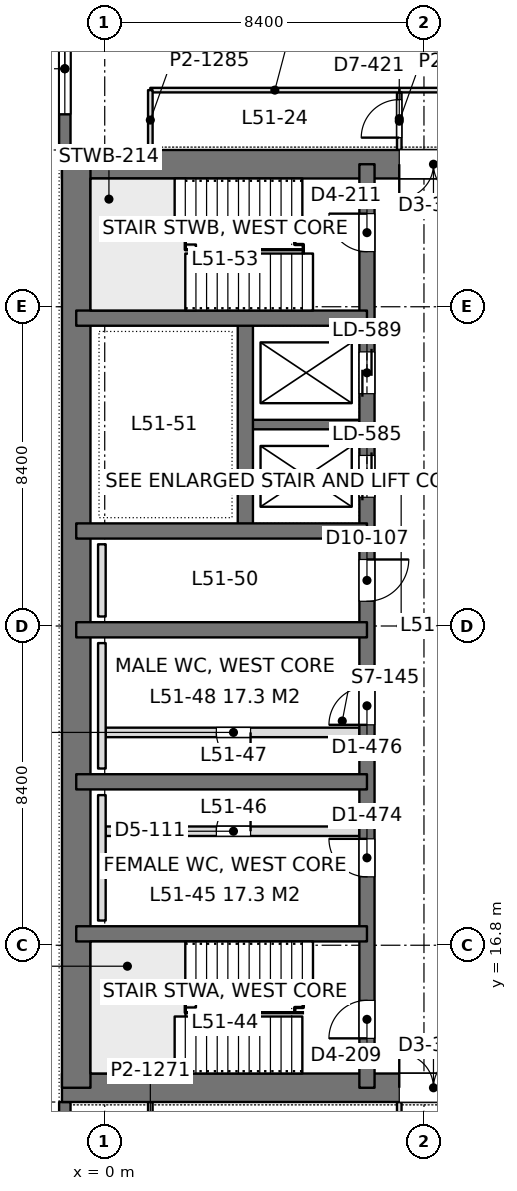
"""IFC4 building model, lengths in metres.
Left out: names, types, materials, properties, quantities, classifications, styles, units other than length and angle.
Written with IfcOpenShell. Run it as: python <this file> out.ifc"""

import sys

from ifc_helpers import new_model, si_unit, direction, frame, frame_2d, origin, place, context, subcontext, project, spatial, rectangle, extrude, element, fill, save


model = new_model("IFC4")
c1 = context("Model", 3, precision=1e-05, world=origin(), true_north=direction((0.0, 1.0)))
c2 = subcontext(c1, "Body", "Model", "MODEL_VIEW")
j1 = project(units=[si_unit("LENGTHUNIT", "METRE"), si_unit("PLANEANGLEUNIT", "RADIAN")], contexts=[c1])
p1 = place(None, origin())
s1 = spatial("IfcSite", under=j1, at=p1, CompositionType="ELEMENT")
p2 = place(p1, origin())
s2 = spatial("IfcBuilding", under=s1, at=p2, CompositionType="ELEMENT")
p3 = place(p2, frame((0.0, 0.0, 223.8)))
s3 = spatial("IfcBuildingStorey", under=s2, at=p3, CompositionType="ELEMENT", Elevation=223.8)
p4 = place(p3, frame((-1.125, 13.05, 0.0), z_axis=(0.0, 0.0, 1.0), x_axis=(1.0, 0.0, 0.0)))
e1 = element("IfcWall", 1, at=p4, inside=s3, PredefinedType="SHEAR", context=c2, shape_type="SweptSolid", body=[
    extrude(rectangle(XDim=17.85, YDim=0.75, at=frame_2d((8.925, 0.0))), origin(), (0.0, 0.0, 1.0), 4.2),
])
p5 = place(p4, frame((8.875, 0.0, 0.0)))
e2 = element("IfcOpeningElement", 2, at=p5, cuts=e1, PredefinedType="OPENING", context=c2, shape_type="SweptSolid", body=[
    extrude(rectangle(XDim=1.8, YDim=2.4, at=frame_2d((0.9, 1.2))), frame((0.0, 0.385, 0.0), z_axis=(0.0, -1.0, 0.0), x_axis=(1.0, 0.0, 0.0)), (0.0, 0.0, 1.0), 0.77),
])
p6 = place(p3, frame((-1.125, 37.35, 0.0), z_axis=(0.0, 0.0, 1.0), x_axis=(1.0, 0.0, 0.0)))
e3 = element("IfcWall", 3, at=p6, inside=s3, PredefinedType="SHEAR", context=c2, shape_type="SweptSolid", body=[
    extrude(rectangle(XDim=17.85, YDim=0.75, at=frame_2d((8.925, 0.0))), origin(), (0.0, 0.0, 1.0), 4.2),
])
p7 = place(p6, frame((8.875, 0.0, 0.0)))
e4 = element("IfcOpeningElement", 4, at=p7, cuts=e3, PredefinedType="OPENING", context=c2, shape_type="SweptSolid", body=[
    extrude(rectangle(XDim=1.8, YDim=2.4, at=frame_2d((0.9, 1.2))), frame((0.0, 0.385, 0.0), z_axis=(0.0, -1.0, 0.0), x_axis=(1.0, 0.0, 0.0)), (0.0, 0.0, 1.0), 0.77),
])
p8 = place(p3, frame((-0.75, 13.05, 0.0), z_axis=(0.0, 0.0, 1.0), x_axis=(0.0, 1.0, 0.0)))
e5 = element("IfcWall", 5, at=p8, inside=s3, PredefinedType="SHEAR", context=c2, shape_type="SweptSolid", body=[
    extrude(rectangle(XDim=24.3, YDim=0.75, at=frame_2d((12.15, 0.0))), origin(), (0.0, 0.0, 1.0), 4.2),
])
p9 = place(p3, frame((6.9, 13.05, 0.0), z_axis=(0.0, 0.0, 1.0), x_axis=(0.0, 1.0, 0.0)))
e6 = element("IfcWall", 6, at=p9, inside=s3, PredefinedType="SHEAR", context=c2, shape_type="SweptSolid", body=[
    extrude(rectangle(XDim=24.3, YDim=0.4, at=frame_2d((12.15, 0.0))), origin(), (0.0, 0.0, 1.0), 4.2),
])
p10 = place(p9, frame((1.3, 0.0, 0.0)))
e7 = element("IfcOpeningElement", 7, at=p10, cuts=e6, PredefinedType="OPENING", context=c2, shape_type="SweptSolid", body=[
    extrude(rectangle(XDim=1.0, YDim=2.2, at=frame_2d((0.5, 1.1))), frame((0.0, 0.21, 0.0), z_axis=(0.0, -1.0, 0.0), x_axis=(1.0, 0.0, 0.0)), (0.0, 0.0, 1.0), 0.42),
])
p11 = place(p9, frame((22.0, 0.0, 0.0)))
e8 = element("IfcOpeningElement", 8, at=p11, cuts=e6, PredefinedType="OPENING", context=c2, shape_type="SweptSolid", body=[
    extrude(rectangle(XDim=1.0, YDim=2.2, at=frame_2d((0.5, 1.1))), frame((0.0, 0.21, 0.0), z_axis=(0.0, -1.0, 0.0), x_axis=(1.0, 0.0, 0.0)), (0.0, 0.0, 1.0), 0.42),
])
p12 = place(p9, frame((5.55, 0.0, 0.0)))
e9 = element("IfcOpeningElement", 9, at=p12, cuts=e6, PredefinedType="OPENING", context=c2, shape_type="SweptSolid", body=[
    extrude(rectangle(XDim=1.0, YDim=2.2, at=frame_2d((0.5, 1.1))), frame((0.0, 0.21, 0.0), z_axis=(0.0, -1.0, 0.0), x_axis=(1.0, 0.0, 0.0)), (0.0, 0.0, 1.0), 0.42),
])
p13 = place(p9, frame((9.55, 0.0, 0.0)))
e10 = element("IfcOpeningElement", 10, at=p13, cuts=e6, PredefinedType="OPENING", context=c2, shape_type="SweptSolid", body=[
    extrude(rectangle(XDim=1.0, YDim=2.2, at=frame_2d((0.5, 1.1))), frame((0.0, 0.21, 0.0), z_axis=(0.0, -1.0, 0.0), x_axis=(1.0, 0.0, 0.0)), (0.0, 0.0, 1.0), 0.42),
])
p14 = place(p9, frame((12.8, 0.0, 0.0)))
e11 = element("IfcOpeningElement", 11, at=p14, cuts=e6, PredefinedType="OPENING", context=c2, shape_type="SweptSolid", body=[
    extrude(rectangle(XDim=1.1, YDim=2.2, at=frame_2d((0.55, 1.1))), frame((0.0, 0.21, 0.0), z_axis=(0.0, -1.0, 0.0), x_axis=(1.0, 0.0, 0.0)), (0.0, 0.0, 1.0), 0.42),
])
p15 = place(p9, frame((15.538, 0.0, 0.0)))
e12 = element("IfcOpeningElement", 12, at=p15, cuts=e6, PredefinedType="OPENING", context=c2, shape_type="SweptSolid", body=[
    extrude(rectangle(XDim=1.1, YDim=2.2, at=frame_2d((0.55, 1.1))), frame((0.0, 0.21, 0.0), z_axis=(0.0, -1.0, 0.0), x_axis=(1.0, 0.0, 0.0)), (0.0, 0.0, 1.0), 0.42),
])
p16 = place(p9, frame((18.262, 0.0, 0.0)))
e13 = element("IfcOpeningElement", 13, at=p16, cuts=e6, PredefinedType="OPENING", context=c2, shape_type="SweptSolid", body=[
    extrude(rectangle(XDim=1.1, YDim=2.2, at=frame_2d((0.55, 1.1))), frame((0.0, 0.21, 0.0), z_axis=(0.0, -1.0, 0.0), x_axis=(1.0, 0.0, 0.0)), (0.0, 0.0, 1.0), 0.42),
])
for number, where, z_axis, x_axis in (
    (14, (-0.75, 17.1, 0.0), (0.0, 0.0, 1.0), (1.0, 0.0, 0.0)),
    (15, (-0.75, 21.1, 0.0), (0.0, 0.0, 1.0), (1.0, 0.0, 0.0)),
    (16, (-0.75, 25.1, 0.0), (0.0, 0.0, 1.0), (1.0, 0.0, 0.0)),
    (17, (-0.75, 27.7, 0.0), (0.0, 0.0, 1.0), (1.0, 0.0, 0.0)),
    (18, (-0.75, 33.3, 0.0), (0.0, 0.0, 1.0), (1.0, 0.0, 0.0)),
):
    element("IfcWall", number, at=place(p3, frame(where, z_axis=z_axis, x_axis=x_axis)), inside=s3, PredefinedType="SHEAR", context=c2, shape_type="SweptSolid", body=[
        extrude(rectangle(XDim=7.65, YDim=0.4, at=frame_2d((3.825, 0.0))), origin(), (0.0, 0.0, 1.0), 4.2),
    ])
p17 = place(p3, frame((3.7, 27.7, 0.0), z_axis=(0.0, 0.0, 1.0), x_axis=(0.0, 1.0, 0.0)))
e19 = element("IfcWall", 19, at=p17, inside=s3, PredefinedType="SHEAR", context=c2, shape_type="SweptSolid", body=[
    extrude(rectangle(XDim=5.6, YDim=0.4, at=frame_2d((2.8, 0.0))), origin(), (0.0, 0.0, 1.0), 4.2),
])
p18 = place(p3, frame((3.7, 30.5, 0.0), z_axis=(0.0, 0.0, 1.0), x_axis=(1.0, 0.0, 0.0)))
e20 = element("IfcWall", 20, at=p18, inside=s3, PredefinedType="SHEAR", context=c2, shape_type="SweptSolid", body=[
    extrude(rectangle(XDim=3.2, YDim=0.25, at=frame_2d((1.6, 0.0))), origin(), (0.0, 0.0, 1.0), 4.2),
])
p19 = place(p3, frame((-1.05, 8.4, 0.0), z_axis=(0.0, 0.0, 1.0), x_axis=(0.0, 1.0, 0.0)))
e21 = element("IfcWall", 21, at=p19, inside=s3, PredefinedType="SOLIDWALL", context=c2, shape_type="SweptSolid", body=[
    extrude(rectangle(XDim=4.275, YDim=0.3, at=frame_2d((2.138, 0.0))), origin(), (0.0, 0.0, 1.0), 4.05),
])
p20 = place(p19, frame((0.938, 0.0, 0.9)))
e22 = element("IfcOpeningElement", 22, at=p20, cuts=e21, PredefinedType="OPENING", context=c2, shape_type="SweptSolid", body=[
    extrude(rectangle(XDim=2.4, YDim=1.9, at=frame_2d((1.2, 0.95))), frame((0.0, 0.16, 0.0), z_axis=(0.0, -1.0, 0.0), x_axis=(1.0, 0.0, 0.0)), (0.0, 0.0, 1.0), 0.32),
])
p21 = place(p3, frame((-1.05, 37.725, 0.0), z_axis=(0.0, 0.0, 1.0), x_axis=(0.0, 1.0, 0.0)))
e23 = element("IfcWall", 23, at=p21, inside=s3, PredefinedType="SOLIDWALL", context=c2, shape_type="SweptSolid", body=[
    extrude(rectangle(XDim=4.275, YDim=0.3, at=frame_2d((2.137, 0.0))), origin(), (0.0, 0.0, 1.0), 4.05),
])
p22 = place(p21, frame((0.938, 0.0, 0.9)))
e24 = element("IfcOpeningElement", 24, at=p22, cuts=e23, PredefinedType="OPENING", context=c2, shape_type="SweptSolid", body=[
    extrude(rectangle(XDim=2.4, YDim=1.9, at=frame_2d((1.2, 0.95))), frame((0.0, 0.16, 0.0), z_axis=(0.0, -1.0, 0.0), x_axis=(1.0, 0.0, 0.0)), (0.0, 0.0, 1.0), 0.32),
])
p23 = place(p3, frame((7.75, 11.158, 0.0), z_axis=(0.0, 0.0, 1.0), x_axis=(0.0, 1.0, 0.0)))
e25 = element("IfcWall", 25, at=p23, inside=s3, PredefinedType="PARTITIONING", context=c2, shape_type="SweptSolid", body=[
    extrude(rectangle(XDim=1.518, YDim=0.12, at=frame_2d((0.759, 0.0))), origin(), (0.0, 0.0, 1.0), 4.05),
])
p24 = place(p23, frame((0.192, 0.0, 0.0)))
e26 = element("IfcOpeningElement", 26, at=p24, cuts=e25, PredefinedType="OPENING", context=c2, shape_type="SweptSolid", body=[
    extrude(rectangle(XDim=1.0, YDim=2.4, at=frame_2d((0.5, 1.2))), frame((0.0, 0.07, 0.0), z_axis=(0.0, -1.0, 0.0), x_axis=(1.0, 0.0, 0.0)), (0.0, 0.0, 1.0), 0.14),
])
p25 = place(p3, frame((1.2, 11.1, 0.0), z_axis=(0.0, 0.0, 1.0), x_axis=(0.0, 1.0, 0.0)))
e27 = element("IfcWall", 27, at=p25, inside=s3, PredefinedType="PARTITIONING", context=c2, shape_type="SweptSolid", body=[
    extrude(rectangle(XDim=1.576, YDim=0.12, at=frame_2d((0.788, 0.0))), origin(), (0.0, 0.0, 1.0), 4.05),
])
p26 = place(p3, frame((7.748, 39.3, 0.0), z_axis=(0.0, 0.0, 1.0), x_axis=(1.0, 0.0, 0.0)))
e28 = element("IfcWall", 28, at=p26, inside=s3, PredefinedType="PARTITIONING", context=c2, shape_type="SweptSolid", body=[
    extrude(rectangle(XDim=41.452, YDim=0.12, at=frame_2d((20.726, 0.0))), origin(), (0.0, 0.0, 1.0), 3.55),
])
p27 = place(p26, frame((1.527, 0.0, 0.0)))
e29 = element("IfcOpeningElement", 29, at=p27, cuts=e28, PredefinedType="OPENING", context=c2, shape_type="SweptSolid", body=[
    extrude(rectangle(XDim=1.8, YDim=2.2, at=frame_2d((0.9, 1.1))), frame((0.0, 0.07, 0.0), z_axis=(0.0, -1.0, 0.0), x_axis=(1.0, 0.0, 0.0)), (0.0, 0.0, 1.0), 0.14),
])
p28 = place(p26, frame((8.152, 0.0, 0.0)))
e30 = element("IfcOpeningElement", 30, at=p28, cuts=e28, PredefinedType="OPENING", context=c2, shape_type="SweptSolid", body=[
    extrude(rectangle(XDim=1.8, YDim=2.2, at=frame_2d((0.9, 1.1))), frame((0.0, 0.07, 0.0), z_axis=(0.0, -1.0, 0.0), x_axis=(1.0, 0.0, 0.0)), (0.0, 0.0, 1.0), 0.14),
])
p29 = place(p26, frame((12.352, 0.0, 0.0)))
e31 = element("IfcOpeningElement", 31, at=p29, cuts=e28, PredefinedType="OPENING", context=c2, shape_type="SweptSolid", body=[
    extrude(rectangle(XDim=1.8, YDim=2.2, at=frame_2d((0.9, 1.1))), frame((0.0, 0.07, 0.0), z_axis=(0.0, -1.0, 0.0), x_axis=(1.0, 0.0, 0.0)), (0.0, 0.0, 1.0), 0.14),
])
p30 = place(p26, frame((20.752, 0.0, 0.0)))
e32 = element("IfcOpeningElement", 32, at=p30, cuts=e28, PredefinedType="OPENING", context=c2, shape_type="SweptSolid", body=[
    extrude(rectangle(XDim=1.8, YDim=2.2, at=frame_2d((0.9, 1.1))), frame((0.0, 0.07, 0.0), z_axis=(0.0, -1.0, 0.0), x_axis=(1.0, 0.0, 0.0)), (0.0, 0.0, 1.0), 0.14),
])
p31 = place(p26, frame((24.952, 0.0, 0.0)))
e33 = element("IfcOpeningElement", 33, at=p31, cuts=e28, PredefinedType="OPENING", context=c2, shape_type="SweptSolid", body=[
    extrude(rectangle(XDim=1.8, YDim=2.2, at=frame_2d((0.9, 1.1))), frame((0.0, 0.07, 0.0), z_axis=(0.0, -1.0, 0.0), x_axis=(1.0, 0.0, 0.0)), (0.0, 0.0, 1.0), 0.14),
])
p32 = place(p26, frame((32.952, 0.0, 0.0)))
e34 = element("IfcOpeningElement", 34, at=p32, cuts=e28, PredefinedType="OPENING", context=c2, shape_type="SweptSolid", body=[
    extrude(rectangle(XDim=1.8, YDim=2.2, at=frame_2d((0.9, 1.1))), frame((0.0, 0.07, 0.0), z_axis=(0.0, -1.0, 0.0), x_axis=(1.0, 0.0, 0.0)), (0.0, 0.0, 1.0), 0.14),
])
p33 = place(p26, frame((36.752, 0.0, 0.0)))
e35 = element("IfcOpeningElement", 35, at=p33, cuts=e28, PredefinedType="OPENING", context=c2, shape_type="SweptSolid", body=[
    extrude(rectangle(XDim=1.8, YDim=2.2, at=frame_2d((0.9, 1.1))), frame((0.0, 0.07, 0.0), z_axis=(0.0, -1.0, 0.0), x_axis=(1.0, 0.0, 0.0)), (0.0, 0.0, 1.0), 0.14),
])
p34 = place(p3, frame((7.75, 37.724, 0.0), z_axis=(0.0, 0.0, 1.0), x_axis=(0.0, 1.0, 0.0)))
e36 = element("IfcWall", 36, at=p34, inside=s3, PredefinedType="PARTITIONING", context=c2, shape_type="SweptSolid", body=[
    extrude(rectangle(XDim=1.518, YDim=0.12, at=frame_2d((0.759, 0.0))), origin(), (0.0, 0.0, 1.0), 4.05),
])
p35 = place(p34, frame((0.326, 0.0, 0.0)))
e37 = element("IfcOpeningElement", 37, at=p35, cuts=e36, PredefinedType="OPENING", context=c2, shape_type="SweptSolid", body=[
    extrude(rectangle(XDim=1.0, YDim=2.4, at=frame_2d((0.5, 1.2))), frame((0.0, 0.07, 0.0), z_axis=(0.0, -1.0, 0.0), x_axis=(1.0, 0.0, 0.0)), (0.0, 0.0, 1.0), 0.14),
])
p36 = place(p3, frame((1.2, 39.3, 0.0), z_axis=(0.0, 0.0, 1.0), x_axis=(1.0, 0.0, 0.0)))
e38 = element("IfcWall", 38, at=p36, inside=s3, PredefinedType="PARTITIONING", context=c2, shape_type="SweptSolid", body=[
    extrude(rectangle(XDim=6.552, YDim=0.12, at=frame_2d((3.276, 0.0))), origin(), (0.0, 0.0, 1.0), 3.69),
])
p37 = place(p3, frame((1.2, 37.724, 0.0), z_axis=(0.0, 0.0, 1.0), x_axis=(0.0, 1.0, 0.0)))
e39 = element("IfcWall", 39, at=p37, inside=s3, PredefinedType="PARTITIONING", context=c2, shape_type="SweptSolid", body=[
    extrude(rectangle(XDim=1.576, YDim=0.12, at=frame_2d((0.788, 0.0))), origin(), (0.0, 0.0, 1.0), 4.05),
])
p38 = place(p3, frame((0.025, 22.4, 0.0), z_axis=(0.0, 0.0, 1.0), x_axis=(1.0, 0.0, 0.0)))
e40 = element("IfcWall", 40, at=p38, inside=s3, PredefinedType="PARTITIONING", context=c2, shape_type="SweptSolid", body=[
    extrude(rectangle(XDim=6.675, YDim=0.25, at=frame_2d((3.337, 0.0))), origin(), (0.0, 0.0, 1.0), 4.0),
])
p39 = place(p38, frame((2.913, 0.0, 0.0)))
e41 = element("IfcOpeningElement", 41, at=p39, cuts=e40, PredefinedType="OPENING", context=c2, shape_type="SweptSolid", body=[
    extrude(rectangle(XDim=0.9, YDim=2.2, at=frame_2d((0.45, 1.1))), frame((0.0, 0.135, 0.0), z_axis=(0.0, -1.0, 0.0), x_axis=(1.0, 0.0, 0.0)), (0.0, 0.0, 1.0), 0.27),
])
p40 = place(p3, frame((0.025, 19.8, 0.0), z_axis=(0.0, 0.0, 1.0), x_axis=(1.0, 0.0, 0.0)))
e42 = element("IfcWall", 42, at=p40, inside=s3, PredefinedType="PARTITIONING", context=c2, shape_type="SweptSolid", body=[
    extrude(rectangle(XDim=6.675, YDim=0.25, at=frame_2d((3.337, 0.0))), origin(), (0.0, 0.0, 1.0), 4.0),
])
p41 = place(p40, frame((2.913, 0.0, 0.0)))
e43 = element("IfcOpeningElement", 43, at=p41, cuts=e42, PredefinedType="OPENING", context=c2, shape_type="SweptSolid", body=[
    extrude(rectangle(XDim=0.9, YDim=2.2, at=frame_2d((0.45, 1.1))), frame((0.0, 0.135, 0.0), z_axis=(0.0, -1.0, 0.0), x_axis=(1.0, 0.0, 0.0)), (0.0, 0.0, 1.0), 0.27),
])
for number, where, z_axis, x_axis in (
    (44, (-0.075, 17.45, 0.0), (0.0, 0.0, 1.0), (0.0, 1.0, 0.0)),
    (45, (-0.075, 21.45, 0.0), (0.0, 0.0, 1.0), (0.0, 1.0, 0.0)),
):
    element("IfcWall", number, at=place(p3, frame(where, z_axis=z_axis, x_axis=x_axis)), inside=s3, PredefinedType="PLUMBINGWALL", context=c2, shape_type="SweptSolid", body=[
        extrude(rectangle(XDim=3.3, YDim=0.2, at=frame_2d((1.65, 0.0))), origin(), (0.0, 0.0, 1.0), 1.2),
    ])
p42 = place(p3, frame((-0.075, 25.45, 0.0), z_axis=(0.0, 0.0, 1.0), x_axis=(0.0, 1.0, 0.0)))
e46 = element("IfcWall", 46, at=p42, inside=s3, PredefinedType="PLUMBINGWALL", context=c2, shape_type="SweptSolid", body=[
    extrude(rectangle(XDim=1.9, YDim=0.2, at=frame_2d((0.95, 0.0))), origin(), (0.0, 0.0, 1.0), 1.2),
])
p43 = place(p22, origin())
e47 = element("IfcWindow", 47, at=p43, inside=s3, PartitioningType="SINGLE_PANEL", PredefinedType="WINDOW", context=c2, shape_type="SweptSolid", body=[
    extrude(rectangle(XDim=2.4, YDim=1.9, at=frame_2d((1.2, 0.95))), frame((0.0, 0.03, 0.0), z_axis=(0.0, -1.0, 0.0), x_axis=(1.0, 0.0, 0.0)), (0.0, 0.0, 1.0), 0.06),
])
fill(e24, e47)
p44 = place(p5, origin())
e48 = element("IfcDoor", 48, at=p44, inside=s3, OperationType="DOUBLE_DOOR_SINGLE_SWING", PredefinedType="DOOR", context=c2, shape_type="SweptSolid", body=[
    extrude(rectangle(XDim=1.8, YDim=2.4, at=frame_2d((0.9, 1.2))), frame((0.0, 0.025, 0.0), z_axis=(0.0, -1.0, 0.0), x_axis=(1.0, 0.0, 0.0)), (0.0, 0.0, 1.0), 0.05),
])
fill(e2, e48)
p45 = place(p7, frame((1.8, 0.0, 0.0), z_axis=(0.0, 0.0, 1.0), x_axis=(-1.0, 0.0, 0.0)))
e49 = element("IfcDoor", 49, at=p45, inside=s3, OperationType="DOUBLE_DOOR_SINGLE_SWING", PredefinedType="DOOR", context=c2, shape_type="SweptSolid", body=[
    extrude(rectangle(XDim=1.8, YDim=2.4, at=frame_2d((0.9, 1.2))), frame((0.0, 0.025, 0.0), z_axis=(0.0, -1.0, 0.0), x_axis=(1.0, 0.0, 0.0)), (0.0, 0.0, 1.0), 0.05),
])
fill(e4, e49)
p46 = place(p10, origin())
e50 = element("IfcDoor", 50, at=p46, inside=s3, OperationType="SINGLE_SWING_LEFT", PredefinedType="DOOR", context=c2, shape_type="SweptSolid", body=[
    extrude(rectangle(XDim=1.0, YDim=2.2, at=frame_2d((0.5, 1.1))), frame((0.0, 0.025, 0.0), z_axis=(0.0, -1.0, 0.0), x_axis=(1.0, 0.0, 0.0)), (0.0, 0.0, 1.0), 0.05),
])
fill(e7, e50)
p47 = place(p11, origin())
e51 = element("IfcDoor", 51, at=p47, inside=s3, OperationType="SINGLE_SWING_RIGHT", PredefinedType="DOOR", context=c2, shape_type="SweptSolid", body=[
    extrude(rectangle(XDim=1.0, YDim=2.2, at=frame_2d((0.5, 1.1))), frame((0.0, 0.025, 0.0), z_axis=(0.0, -1.0, 0.0), x_axis=(1.0, 0.0, 0.0)), (0.0, 0.0, 1.0), 0.05),
])
fill(e8, e51)
p48 = place(p12, origin())
e52 = element("IfcDoor", 52, at=p48, inside=s3, OperationType="SINGLE_SWING_RIGHT", PredefinedType="DOOR", context=c2, shape_type="SweptSolid", body=[
    extrude(rectangle(XDim=1.0, YDim=2.2, at=frame_2d((0.5, 1.1))), frame((0.0, 0.025, 0.0), z_axis=(0.0, -1.0, 0.0), x_axis=(1.0, 0.0, 0.0)), (0.0, 0.0, 1.0), 0.05),
])
fill(e9, e52)
p49 = place(p13, origin())
e53 = element("IfcDoor", 53, at=p49, inside=s3, OperationType="SINGLE_SWING_LEFT", PredefinedType="DOOR", context=c2, shape_type="SweptSolid", body=[
    extrude(rectangle(XDim=1.0, YDim=2.2, at=frame_2d((0.5, 1.1))), frame((0.0, 0.025, 0.0), z_axis=(0.0, -1.0, 0.0), x_axis=(1.0, 0.0, 0.0)), (0.0, 0.0, 1.0), 0.05),
])
fill(e10, e53)
p50 = place(p14, frame((1.1, 0.0, 0.0), z_axis=(0.0, 0.0, 1.0), x_axis=(-1.0, 0.0, 0.0)))
e54 = element("IfcDoor", 54, at=p50, inside=s3, OperationType="SINGLE_SWING_LEFT", PredefinedType="DOOR", context=c2, shape_type="SweptSolid", body=[
    extrude(rectangle(XDim=1.1, YDim=2.2, at=frame_2d((0.55, 1.1))), frame((0.0, 0.025, 0.0), z_axis=(0.0, -1.0, 0.0), x_axis=(1.0, 0.0, 0.0)), (0.0, 0.0, 1.0), 0.05),
])
fill(e11, e54)
p51 = place(p15, origin())
e55 = element("IfcDoor", 55, at=p51, inside=s3, OperationType="DOUBLE_DOOR_SLIDING", PredefinedType="DOOR", context=c2, shape_type="SweptSolid", body=[
    extrude(rectangle(XDim=1.1, YDim=2.2, at=frame_2d((0.55, 1.1))), frame((0.0, 0.025, 0.0), z_axis=(0.0, -1.0, 0.0), x_axis=(1.0, 0.0, 0.0)), (0.0, 0.0, 1.0), 0.05),
])
fill(e12, e55)
p52 = place(p16, origin())
e56 = element("IfcDoor", 56, at=p52, inside=s3, OperationType="DOUBLE_DOOR_SLIDING", PredefinedType="DOOR", context=c2, shape_type="SweptSolid", body=[
    extrude(rectangle(XDim=1.1, YDim=2.2, at=frame_2d((0.55, 1.1))), frame((0.0, 0.025, 0.0), z_axis=(0.0, -1.0, 0.0), x_axis=(1.0, 0.0, 0.0)), (0.0, 0.0, 1.0), 0.05),
])
fill(e13, e56)
p53 = place(p35, origin())
e57 = element("IfcDoor", 57, at=p53, inside=s3, OperationType="SINGLE_SWING_LEFT", PredefinedType="DOOR", context=c2, shape_type="SweptSolid", body=[
    extrude(rectangle(XDim=1.0, YDim=2.4, at=frame_2d((0.5, 1.2))), frame((0.0, 0.025, 0.0), z_axis=(0.0, -1.0, 0.0), x_axis=(1.0, 0.0, 0.0)), (0.0, 0.0, 1.0), 0.05),
])
fill(e37, e57)
p54 = place(p39, frame((0.9, 0.0, 0.0), z_axis=(0.0, 0.0, 1.0), x_axis=(-1.0, 0.0, 0.0)))
e58 = element("IfcDoor", 58, at=p54, inside=s3, OperationType="SINGLE_SWING_LEFT", PredefinedType="DOOR", context=c2, shape_type="SweptSolid", body=[
    extrude(rectangle(XDim=0.9, YDim=2.2, at=frame_2d((0.45, 1.1))), frame((0.0, 0.025, 0.0), z_axis=(0.0, -1.0, 0.0), x_axis=(1.0, 0.0, 0.0)), (0.0, 0.0, 1.0), 0.05),
])
fill(e41, e58)
p55 = place(p41, origin())
e59 = element("IfcDoor", 59, at=p55, inside=s3, OperationType="SINGLE_SWING_RIGHT", PredefinedType="DOOR", context=c2, shape_type="SweptSolid", body=[
    extrude(rectangle(XDim=0.9, YDim=2.2, at=frame_2d((0.45, 1.1))), frame((0.0, 0.025, 0.0), z_axis=(0.0, -1.0, 0.0), x_axis=(1.0, 0.0, 0.0)), (0.0, 0.0, 1.0), 0.05),
])
fill(e43, e59)
save(model, sys.argv[1])
